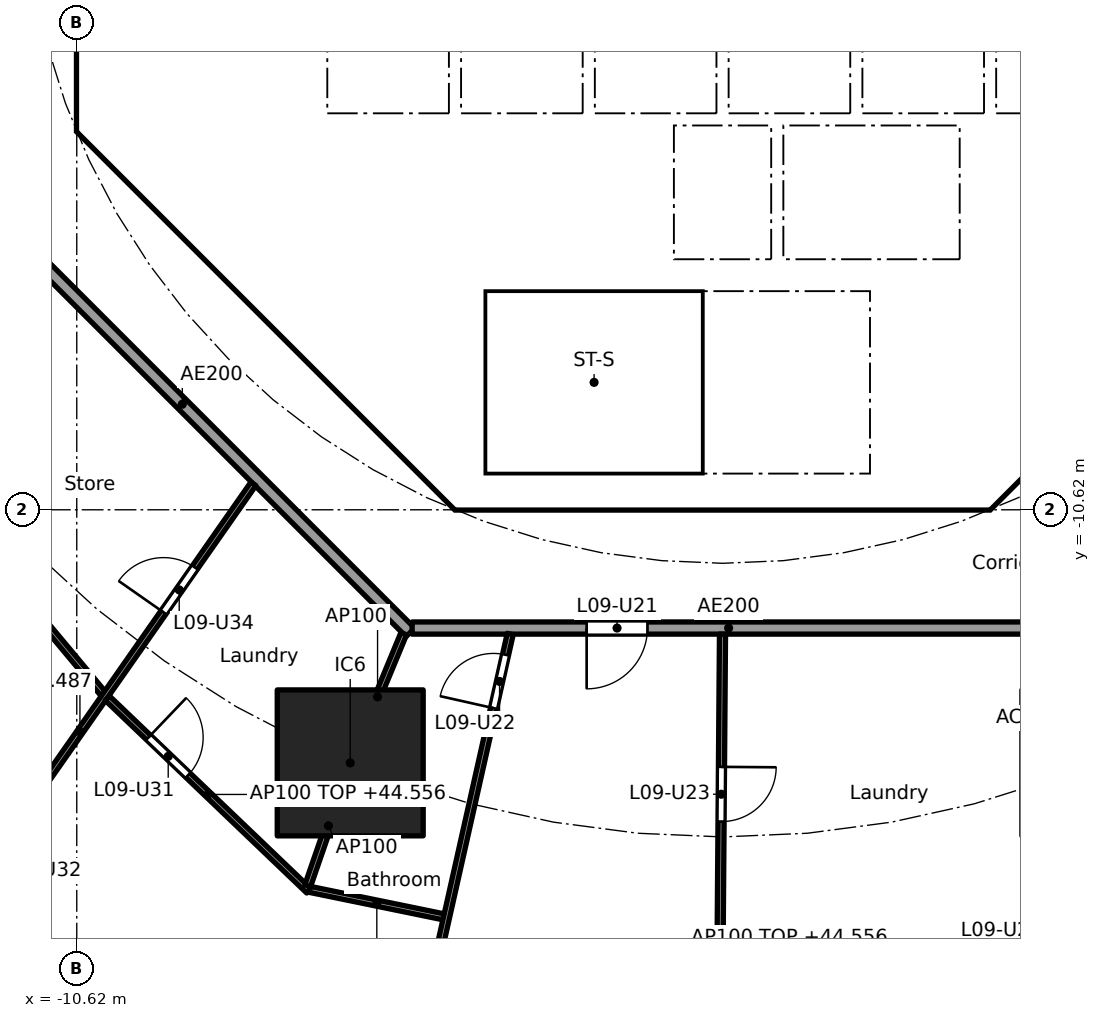
"""IFC4 building model, lengths in metres.
Left out: names, types, materials, properties, quantities, classifications, styles, units other than length and angle.
Written with IfcOpenShell. Run it as: python <this file> out.ifc"""

import sys

from ifc_helpers import new_model, si_unit, direction, frame, frame_2d, origin, origin_2d, place, context, subcontext, project, spatial, polyline, rectangle, outline, extrude, element, fill, save


model = new_model("IFC4")
c1 = context("Model", 3, precision=1e-05, world=origin(), true_north=direction((0.0, 1.0)))
c2 = subcontext(c1, "Body", "Model", "MODEL_VIEW")
j1 = project(units=[si_unit("LENGTHUNIT", "METRE"), si_unit("PLANEANGLEUNIT", "RADIAN")], contexts=[c1])
p1 = place(None, origin())
s1 = spatial("IfcSite", under=j1, at=p1, CompositionType="ELEMENT")
p2 = place(p1, origin())
s2 = spatial("IfcBuilding", under=s1, at=p2, CompositionType="ELEMENT")
p3 = place(p2, frame((0.0, 0.0, 41.8)))
s3 = spatial("IfcBuildingStorey", under=s2, at=p3, CompositionType="ELEMENT", Elevation=41.8)
p4 = place(p3, frame((-6.123, -14.782, 0.0), z_axis=(0.0, 0.0, 1.0), x_axis=(1.0, 0.0, 0.0)))
e1 = element("IfcColumn", 1, at=p4, inside=s3, PredefinedType="COLUMN", context=c2, shape_type="SweptSolid", body=[
    extrude(rectangle(XDim=2.4, YDim=2.4, at=origin_2d()), origin(), (0.0, 0.0, 1.0), 3.7),
])
p5 = place(p3, frame((-10.325, 3.801, 0.0), z_axis=(0.0, 0.0, 1.0), x_axis=(0.0, -1.0, 0.0)))
e2 = element("IfcWall", 2, at=p5, inside=s3, PredefinedType="SHEAR", context=c2, shape_type="SweptSolid", body=[
    extrude(rectangle(XDim=7.602, YDim=0.6, at=frame_2d((3.801, 0.0))), origin(), (0.0, 0.0, 1.0), 3.44),
])
p6 = place(p5, frame((0.651, 0.0, 0.0)))
e3 = element("IfcOpeningElement", 3, at=p6, cuts=e2, PredefinedType="OPENING", context=c2, shape_type="SweptSolid", body=[
    extrude(rectangle(XDim=1.5, YDim=2.1, at=frame_2d((0.75, 1.05))), frame((0.0, 0.31, 0.0), z_axis=(0.0, -1.0, 0.0), x_axis=(1.0, 0.0, 0.0)), (0.0, 0.0, 1.0), 0.62),
])
p7 = place(p5, frame((5.451, 0.0, 0.0)))
e4 = element("IfcOpeningElement", 4, at=p7, cuts=e2, PredefinedType="OPENING", context=c2, shape_type="SweptSolid", body=[
    extrude(rectangle(XDim=1.5, YDim=2.1, at=frame_2d((0.75, 1.05))), frame((0.0, 0.31, 0.0), z_axis=(0.0, -1.0, 0.0), x_axis=(1.0, 0.0, 0.0)), (0.0, 0.0, 1.0), 0.62),
])
p8 = place(p3, frame((-9.988, -4.613, 0.0), z_axis=(0.0, 0.0, 1.0), x_axis=(0.707106781187, -0.707106781187, 0.0)))
e5 = element("IfcWall", 5, at=p8, inside=s3, PredefinedType="SHEAR", context=c2, shape_type="SweptSolid", body=[
    extrude(rectangle(XDim=7.602, YDim=0.6, at=frame_2d((3.801, 0.0))), origin(), (0.0, 0.0, 1.0), 3.44),
])
p9 = place(p8, frame((6.151, 0.0, 0.0)))
e6 = element("IfcOpeningElement", 6, at=p9, cuts=e5, PredefinedType="OPENING", context=c2, shape_type="SweptSolid", body=[
    extrude(rectangle(XDim=1.1, YDim=2.1, at=frame_2d((0.55, 1.05))), frame((0.0, 0.31, 0.0), z_axis=(0.0, -1.0, 0.0), x_axis=(1.0, 0.0, 0.0)), (0.0, 0.0, 1.0), 0.62),
])
p10 = place(p3, frame((4.613, -9.988, 0.0), z_axis=(0.0, 0.0, 1.0), x_axis=(0.707106781187, 0.707106781187, 0.0)))
e7 = element("IfcWall", 7, at=p10, inside=s3, PredefinedType="SHEAR", context=c2, shape_type="SweptSolid", body=[
    extrude(rectangle(XDim=7.602, YDim=0.6, at=frame_2d((3.801, 0.0))), origin(), (0.0, 0.0, 1.0), 3.44),
])
p11 = place(p10, frame((3.201, 0.0, 0.0)))
e8 = element("IfcOpeningElement", 8, at=p11, cuts=e7, PredefinedType="OPENING", context=c2, shape_type="SweptSolid", body=[
    extrude(rectangle(XDim=1.2, YDim=2.1, at=frame_2d((0.6, 1.05))), frame((0.0, 0.31, 0.0), z_axis=(0.0, -1.0, 0.0), x_axis=(1.0, 0.0, 0.0)), (0.0, 0.0, 1.0), 0.62),
])
p12 = place(p3, frame((4.0, -10.025, 0.0), z_axis=(0.0, 0.0, 1.0), x_axis=(0.0, 1.0, 0.0)))
e9 = element("IfcWall", 9, at=p12, inside=s3, PredefinedType="SOLIDWALL", context=c2, shape_type="SweptSolid", body=[
    extrude(rectangle(XDim=3.0, YDim=0.2, at=frame_2d((1.5, 0.0))), origin(), (0.0, 0.0, 1.0), 3.44),
])
p13 = place(p12, frame((0.975, 0.0, 0.0)))
e10 = element("IfcOpeningElement", 10, at=p13, cuts=e9, PredefinedType="OPENING", context=c2, shape_type="SweptSolid", body=[
    extrude(rectangle(XDim=1.1, YDim=2.1, at=frame_2d((0.55, 1.05))), frame((0.0, 0.11, 0.0), z_axis=(0.0, -1.0, 0.0), x_axis=(1.0, 0.0, 0.0)), (0.0, 0.0, 1.0), 0.22),
])
p14 = place(p3, frame((-6.2, -7.827, 0.0), z_axis=(0.0, 0.0, 1.0), x_axis=(0.0, 1.0, 0.0)))
e11 = element("IfcWall", 11, at=p14, inside=s3, PredefinedType="PARTITIONING", context=c2, shape_type="SweptSolid", body=[
    extrude(rectangle(XDim=3.527, YDim=0.15, at=frame_2d((1.763, 0.0))), origin(), (0.0, 0.0, 1.0), 3.44),
])
p15 = place(p14, frame((2.365, 0.0, 0.0)))
e12 = element("IfcOpeningElement", 12, at=p15, cuts=e11, PredefinedType="OPENING", context=c2, shape_type="SweptSolid", body=[
    extrude(rectangle(XDim=0.9, YDim=2.1, at=frame_2d((0.45, 1.05))), frame((0.0, 0.085, 0.0), z_axis=(0.0, -1.0, 0.0), x_axis=(1.0, 0.0, 0.0)), (0.0, 0.0, 1.0), 0.17),
])
p16 = place(p14, frame((0.489, 0.0, 0.0)))
e13 = element("IfcOpeningElement", 13, at=p16, cuts=e11, PredefinedType="OPENING", context=c2, shape_type="SweptSolid", body=[
    extrude(rectangle(XDim=0.9, YDim=2.1, at=frame_2d((0.45, 1.05))), frame((0.0, 0.085, 0.0), z_axis=(0.0, -1.0, 0.0), x_axis=(1.0, 0.0, 0.0)), (0.0, 0.0, 1.0), 0.17),
])
p17 = place(p3, frame((4.0, -6.5, 0.0), z_axis=(0.0, 0.0, 1.0), x_axis=(0.0, 1.0, 0.0)))
e14 = element("IfcWall", 14, at=p17, inside=s3, PredefinedType="SOLIDWALL", context=c2, shape_type="SweptSolid", body=[
    extrude(rectangle(XDim=2.2, YDim=0.2, at=frame_2d((1.1, 0.0))), origin(), (0.0, 0.0, 1.0), 3.44),
])
p18 = place(p17, frame((0.55, 0.0, 0.0)))
e15 = element("IfcOpeningElement", 15, at=p18, cuts=e14, PredefinedType="OPENING", context=c2, shape_type="SweptSolid", body=[
    extrude(rectangle(XDim=1.1, YDim=2.1, at=frame_2d((0.55, 1.05))), frame((0.0, 0.11, 0.0), z_axis=(0.0, -1.0, 0.0), x_axis=(1.0, 0.0, 0.0)), (0.0, 0.0, 1.0), 0.22),
])
p19 = place(p3, frame((-4.0, -6.5, 0.0), z_axis=(0.0, 0.0, 1.0), x_axis=(0.0, 1.0, 0.0)))
e16 = element("IfcWall", 16, at=p19, inside=s3, PredefinedType="SOLIDWALL", context=c2, shape_type="SweptSolid", body=[
    extrude(rectangle(XDim=2.2, YDim=0.2, at=frame_2d((1.1, 0.0))), origin(), (0.0, 0.0, 1.0), 3.44),
])
p20 = place(p19, frame((0.65, 0.0, 0.0)))
e17 = element("IfcOpeningElement", 17, at=p20, cuts=e16, PredefinedType="OPENING", context=c2, shape_type="SweptSolid", body=[
    extrude(rectangle(XDim=0.9, YDim=2.1, at=frame_2d((0.45, 1.05))), frame((0.0, 0.11, 0.0), z_axis=(0.0, -1.0, 0.0), x_axis=(1.0, 0.0, 0.0)), (0.0, 0.0, 1.0), 0.22),
])
p21 = place(p3, origin())
e18 = element("IfcWall", 18, at=p21, inside=s3, PredefinedType="SHEAR", context=c2, shape_type="SweptSolid", body=[
    extrude(outline(polyline([(-10.625, -3.801), (-10.025, -3.801), (-10.025, -4.152), (-9.776, -4.401), (-10.2, -4.825), (-10.625, -4.401), (-10.625, -3.801)])), origin(), (0.0, 0.0, 1.0), 3.44),
])
p22 = place(p3, origin())
e19 = element("IfcWall", 19, at=p22, inside=s3, PredefinedType="SHEAR", context=c2, shape_type="SweptSolid", body=[
    extrude(outline(polyline([(-4.152, -10.025), (4.152, -10.025), (4.401, -9.776), (4.825, -10.2), (4.401, -10.625), (-4.401, -10.625), (-4.825, -10.2), (-4.401, -9.776), (-4.152, -10.025)])), origin(), (0.0, 0.0, 1.0), 3.44),
])
p23 = place(p3, frame((-10.025, -4.0, 0.0), z_axis=(0.0, 0.0, 1.0), x_axis=(1.0, 0.0, 0.0)))
e20 = element("IfcWall", 20, at=p23, inside=s3, PredefinedType="PARTITIONING", context=c2, shape_type="SweptSolid", body=[
    extrude(rectangle(XDim=3.325, YDim=0.2, at=frame_2d((1.662, 0.0))), origin(), (0.0, 0.0, 1.0), 3.44),
])
p24 = place(p3, frame((-8.301, -5.8, 0.0), z_axis=(0.0, 0.0, 1.0), x_axis=(1.0, 0.0, 0.0)))
e21 = element("IfcWall", 21, at=p24, inside=s3, PredefinedType="PARTITIONING", context=c2, shape_type="SweptSolid", body=[
    extrude(rectangle(XDim=2.026, YDim=0.15, at=frame_2d((1.013, 0.0))), origin(), (0.0, 0.0, 1.0), 3.44),
])
for number, where, z_axis, x_axis in (
    (22, (-0.9, -6.5, 0.0), (0.0, 0.0, 1.0), (0.0, 1.0, 0.0)),
    (23, (0.9, -6.5, 0.0), (0.0, 0.0, 1.0), (0.0, 1.0, 0.0)),
):
    element("IfcWall", number, at=place(p3, frame(where, z_axis=z_axis, x_axis=x_axis)), inside=s3, PredefinedType="SOLIDWALL", context=c2, shape_type="SweptSolid", body=[
        extrude(rectangle(XDim=2.2, YDim=0.2, at=frame_2d((1.1, 0.0))), origin(), (0.0, 0.0, 1.0), 3.44),
    ])
p25 = place(p3, origin())
e24 = element("IfcWall", 24, at=p25, inside=s3, PredefinedType="SOLIDWALL", context=c2, shape_type="SweptSolid", body=[
    extrude(outline(polyline([(-6.7, -2.1), (-6.5, -2.1), (-6.5, -4.1), (-4.5, -4.1), (-4.5, -2.1), (-4.3, -2.1), (-4.3, -4.1), (-2.3, -4.1), (-2.3, -2.1), (-2.1, -2.1), (-2.1, -4.1), (-0.1, -4.1), (-0.1, -2.1), (0.1, -2.1), (0.1, -4.1), (2.1, -4.1), (2.1, -2.1), (2.3, -2.1), (2.3, -4.1), (4.3, -4.1), (4.3, -2.1), (4.5, -2.1), (4.5, -4.1), (6.5, -4.1), (6.5, -2.1), (6.7, -2.1), (6.7, -4.3), (-6.7, -4.3), (-6.7, -2.1)])), origin(), (0.0, 0.0, 1.0), 3.44),
])
p26 = place(p3, origin())
e25 = element("IfcWall", 25, at=p26, inside=s3, PredefinedType="SOLIDWALL", context=c2, shape_type="SweptSolid", body=[
    extrude(outline(polyline([(-3.9, -10.025), (-4.1, -10.025), (-4.1, -7.025), (-3.9, -7.025), (-3.9, -10.025)])), origin(), (0.0, 0.0, 1.0), 3.44),
])
p27 = place(p3, origin())
e26 = element("IfcWall", 26, at=p27, inside=s3, PredefinedType="SOLIDWALL", context=c2, shape_type="SweptSolid", body=[
    extrude(outline(polyline([(4.1, -7.025), (-4.1, -7.025), (-4.1, -6.5), (4.1, -6.5), (4.1, -7.025)])), origin(), (0.0, 0.0, 1.0), 3.44),
])
p28 = place(p3, frame((-12.635, -5.134, 0.0), z_axis=(0.0, 0.0, 1.0), x_axis=(0.707106781187, -0.707106781187, 0.0)))
e27 = element("IfcWall", 27, at=p28, inside=s3, PredefinedType="PARTITIONING", context=c2, shape_type="SweptSolid", body=[
    extrude(rectangle(XDim=10.609, YDim=0.2, at=frame_2d((5.305, 0.0))), origin(), (0.0, 0.0, 1.0), 3.44),
])
p29 = place(p3, frame((-5.104, -12.565, 0.0), z_axis=(0.0, 0.0, 1.0), x_axis=(1.0, 0.0, 0.0)))
e28 = element("IfcWall", 28, at=p29, inside=s3, PredefinedType="PARTITIONING", context=c2, shape_type="SweptSolid", body=[
    extrude(rectangle(XDim=10.409, YDim=0.2, at=frame_2d((5.205, 0.0))), origin(), (0.0, 0.0, 1.0), 3.44),
])
p30 = place(p29, frame((2.87, 0.0, 0.0)))
e29 = element("IfcOpeningElement", 29, at=p30, cuts=e28, PredefinedType="OPENING", context=c2, shape_type="SweptSolid", body=[
    extrude(rectangle(XDim=1.0, YDim=2.1, at=frame_2d((0.5, 1.05))), frame((0.0, 0.11, 0.0), z_axis=(0.0, -1.0, 0.0), x_axis=(1.0, 0.0, 0.0)), (0.0, 0.0, 1.0), 0.22),
])
p31 = place(p3, frame((-13.222, -10.007, 0.0), z_axis=(0.0, 0.0, 1.0), x_axis=(0.640807748916, -0.767701393075, 0.0)))
e30 = element("IfcWall", 30, at=p31, inside=s3, PredefinedType="PARTITIONING", context=c2, shape_type="SweptSolid", body=[
    extrude(rectangle(XDim=4.737, YDim=0.1, at=frame_2d((2.368, 0.0))), origin(), (0.0, 0.0, 1.0), 2.756),
])
p32 = place(p3, frame((-7.715, -10.193, 0.0), z_axis=(0.0, 0.0, 1.0), x_axis=(-0.573126502256, -0.819466907454, 0.0)))
e31 = element("IfcWall", 31, at=p32, inside=s3, PredefinedType="PARTITIONING", context=c2, shape_type="SweptSolid", body=[
    extrude(rectangle(XDim=9.954, YDim=0.1, at=frame_2d((4.977, 0.0))), origin(), (0.0, 0.0, 1.0), 2.687),
])
p33 = place(p32, frame((6.631, 0.0, 0.0)))
e32 = element("IfcOpeningElement", 32, at=p33, cuts=e31, PredefinedType="OPENING", context=c2, shape_type="SweptSolid", body=[
    extrude(rectangle(XDim=0.9, YDim=2.1, at=frame_2d((0.45, 1.05))), frame((0.0, 0.06, 0.0), z_axis=(0.0, -1.0, 0.0), x_axis=(1.0, 0.0, 0.0)), (0.0, 0.0, 1.0), 0.12),
])
p34 = place(p32, frame((1.678, 0.0, 0.0)))
e33 = element("IfcOpeningElement", 33, at=p34, cuts=e31, PredefinedType="OPENING", context=c2, shape_type="SweptSolid", body=[
    extrude(rectangle(XDim=0.9, YDim=2.1, at=frame_2d((0.45, 1.05))), frame((0.0, 0.06, 0.0), z_axis=(0.0, -1.0, 0.0), x_axis=(1.0, 0.0, 0.0)), (0.0, 0.0, 1.0), 0.12),
])
p35 = place(p3, frame((-10.119, -13.716, 0.0), z_axis=(0.0, 0.0, 1.0), x_axis=(0.722763212502, -0.69109575216, 0.0)))
e34 = element("IfcWall", 34, at=p35, inside=s3, PredefinedType="PARTITIONING", context=c2, shape_type="SweptSolid", body=[
    extrude(rectangle(XDim=4.587, YDim=0.1, at=frame_2d((2.293, 0.0))), origin(), (0.0, 0.0, 1.0), 2.756),
])
p36 = place(p35, frame((0.938, 0.0, 0.0)))
e35 = element("IfcOpeningElement", 35, at=p36, cuts=e34, PredefinedType="OPENING", context=c2, shape_type="SweptSolid", body=[
    extrude(rectangle(XDim=0.9, YDim=2.1, at=frame_2d((0.45, 1.05))), frame((0.0, 0.06, 0.0), z_axis=(0.0, -1.0, 0.0), x_axis=(1.0, 0.0, 0.0)), (0.0, 0.0, 1.0), 0.12),
])
p37 = place(p3, frame((-5.243, -12.657, 0.0), z_axis=(0.0, 0.0, 1.0), x_axis=(-0.382719158442, -0.923864733477, 0.0)))
e36 = element("IfcWall", 36, at=p37, inside=s3, PredefinedType="PARTITIONING", context=c2, shape_type="SweptSolid", body=[
    extrude(rectangle(XDim=2.25, YDim=0.1, at=frame_2d((1.125, 0.0))), origin(), (0.0, 0.0, 1.0), 3.44),
])
p38 = place(p3, frame((-6.139, -14.83, 0.0), z_axis=(0.0, 0.0, 1.0), x_axis=(-0.327246993321, -0.944938836837, 0.0)))
e37 = element("IfcWall", 37, at=p38, inside=s3, PredefinedType="PARTITIONING", context=c2, shape_type="SweptSolid", body=[
    extrude(rectangle(XDim=2.09, YDim=0.1, at=frame_2d((1.045, 0.0))), origin(), (0.0, 0.0, 1.0), 3.44),
])
p39 = place(p3, frame((-6.791, -16.862, 0.0), z_axis=(0.0, 0.0, 1.0), x_axis=(0.979581941859, -0.201045316246, 0.0)))
e38 = element("IfcWall", 38, at=p39, inside=s3, PredefinedType="PARTITIONING", context=c2, shape_type="SweptSolid", body=[
    extrude(rectangle(XDim=2.256, YDim=0.1, at=frame_2d((1.128, 0.0))), origin(), (0.0, 0.0, 1.0), 2.756),
])
p40 = place(p3, frame((-3.492, -12.662, 0.0), z_axis=(0.0, 0.0, 1.0), x_axis=(-0.219268088006, -0.975664648115, 0.0)))
e39 = element("IfcWall", 39, at=p40, inside=s3, PredefinedType="PARTITIONING", context=c2, shape_type="SweptSolid", body=[
    extrude(rectangle(XDim=18.23, YDim=0.1, at=frame_2d((9.115, 0.0))), origin(), (0.0, 0.0, 1.0), 2.687),
])
p41 = place(p40, frame((0.35, 0.0, 0.0)))
e40 = element("IfcOpeningElement", 40, at=p41, cuts=e39, PredefinedType="OPENING", context=c2, shape_type="SweptSolid", body=[
    extrude(rectangle(XDim=0.9, YDim=2.1, at=frame_2d((0.45, 1.05))), frame((0.0, 0.06, 0.0), z_axis=(0.0, -1.0, 0.0), x_axis=(1.0, 0.0, 0.0)), (0.0, 0.0, 1.0), 0.12),
])
p42 = place(p40, frame((7.497, 0.0, 0.0)))
e41 = element("IfcOpeningElement", 41, at=p42, cuts=e39, PredefinedType="OPENING", context=c2, shape_type="SweptSolid", body=[
    extrude(rectangle(XDim=0.9, YDim=2.1, at=frame_2d((0.45, 1.05))), frame((0.0, 0.06, 0.0), z_axis=(0.0, -1.0, 0.0), x_axis=(1.0, 0.0, 0.0)), (0.0, 0.0, 1.0), 0.12),
])
p43 = place(p3, frame((-0.001, -12.665, 0.0), z_axis=(0.0, 0.0, 1.0), x_axis=(-0.007702417287, -0.999970335944, 0.0)))
e42 = element("IfcWall", 42, at=p43, inside=s3, PredefinedType="PARTITIONING", context=c2, shape_type="SweptSolid", body=[
    extrude(rectangle(XDim=12.171, YDim=0.1, at=frame_2d((6.086, 0.0))), origin(), (0.0, 0.0, 1.0), 2.687),
])
p44 = place(p43, frame((2.183, 0.0, 0.0)))
e43 = element("IfcOpeningElement", 43, at=p44, cuts=e42, PredefinedType="OPENING", context=c2, shape_type="SweptSolid", body=[
    extrude(rectangle(XDim=0.9, YDim=2.1, at=frame_2d((0.45, 1.05))), frame((0.0, 0.06, 0.0), z_axis=(0.0, -1.0, 0.0), x_axis=(1.0, 0.0, 0.0)), (0.0, 0.0, 1.0), 0.12),
])
p45 = place(p43, frame((8.269, 0.0, 0.0)))
e44 = element("IfcOpeningElement", 44, at=p45, cuts=e42, PredefinedType="OPENING", context=c2, shape_type="SweptSolid", body=[
    extrude(rectangle(XDim=0.9, YDim=2.1, at=frame_2d((0.45, 1.05))), frame((0.0, 0.06, 0.0), z_axis=(0.0, -1.0, 0.0), x_axis=(1.0, 0.0, 0.0)), (0.0, 0.0, 1.0), 0.12),
])
p46 = place(p18, origin())
e45 = element("IfcDoor", 45, at=p46, inside=s3, OperationType="DOUBLE_DOOR_SLIDING", PredefinedType="DOOR", context=c2, shape_type="SweptSolid", body=[
    extrude(rectangle(XDim=1.1, YDim=2.1, at=frame_2d((0.55, 1.05))), frame((0.0, 0.025, 0.0), z_axis=(0.0, -1.0, 0.0), x_axis=(1.0, 0.0, 0.0)), (0.0, 0.0, 1.0), 0.05),
])
fill(e15, e45)
p47 = place(p13, origin())
e46 = element("IfcDoor", 46, at=p47, inside=s3, OperationType="SINGLE_SWING_RIGHT", PredefinedType="DOOR", context=c2, shape_type="SweptSolid", body=[
    extrude(rectangle(XDim=1.1, YDim=2.1, at=frame_2d((0.55, 1.05))), frame((0.0, 0.025, 0.0), z_axis=(0.0, -1.0, 0.0), x_axis=(1.0, 0.0, 0.0)), (0.0, 0.0, 1.0), 0.05),
])
fill(e10, e46)
p48 = place(p15, origin())
e47 = element("IfcDoor", 47, at=p48, inside=s3, OperationType="SINGLE_SWING_RIGHT", PredefinedType="DOOR", context=c2, shape_type="SweptSolid", body=[
    extrude(rectangle(XDim=0.9, YDim=2.1, at=frame_2d((0.45, 1.05))), frame((0.0, 0.025, 0.0), z_axis=(0.0, -1.0, 0.0), x_axis=(1.0, 0.0, 0.0)), (0.0, 0.0, 1.0), 0.05),
])
fill(e12, e47)
p49 = place(p16, origin())
e48 = element("IfcDoor", 48, at=p49, inside=s3, OperationType="SINGLE_SWING_RIGHT", PredefinedType="DOOR", context=c2, shape_type="SweptSolid", body=[
    extrude(rectangle(XDim=0.9, YDim=2.1, at=frame_2d((0.45, 1.05))), frame((0.0, 0.025, 0.0), z_axis=(0.0, -1.0, 0.0), x_axis=(1.0, 0.0, 0.0)), (0.0, 0.0, 1.0), 0.05),
])
fill(e13, e48)
p50 = place(p20, frame((0.9, 0.0, 0.0), x_axis=(-1.0, 0.0, 0.0)))
e49 = element("IfcDoor", 49, at=p50, inside=s3, OperationType="SINGLE_SWING_RIGHT", PredefinedType="DOOR", context=c2, shape_type="SweptSolid", body=[
    extrude(rectangle(XDim=0.9, YDim=2.1, at=frame_2d((0.45, 1.05))), frame((0.0, 0.025, 0.0), z_axis=(0.0, -1.0, 0.0), x_axis=(1.0, 0.0, 0.0)), (0.0, 0.0, 1.0), 0.05),
])
fill(e17, e49)
p51 = place(p7, origin())
e50 = element("IfcDoor", 50, at=p51, inside=s3, OperationType="DOUBLE_DOOR_SINGLE_SWING", PredefinedType="DOOR", context=c2, shape_type="SweptSolid", body=[
    extrude(rectangle(XDim=1.5, YDim=2.1, at=frame_2d((0.75, 1.05))), frame((0.0, 0.025, 0.0), z_axis=(0.0, -1.0, 0.0), x_axis=(1.0, 0.0, 0.0)), (0.0, 0.0, 1.0), 0.05),
])
fill(e4, e50)
p52 = place(p9, origin())
e51 = element("IfcDoor", 51, at=p52, inside=s3, OperationType="SINGLE_SWING_RIGHT", PredefinedType="DOOR", context=c2, shape_type="SweptSolid", body=[
    extrude(rectangle(XDim=1.1, YDim=2.1, at=frame_2d((0.55, 1.05))), frame((0.0, 0.025, 0.0), z_axis=(0.0, -1.0, 0.0), x_axis=(1.0, 0.0, 0.0)), (0.0, 0.0, 1.0), 0.05),
])
fill(e6, e51)
p53 = place(p30, frame((1.0, 0.0, 0.0), x_axis=(-1.0, 0.0, 0.0)))
e52 = element("IfcDoor", 52, at=p53, inside=s3, OperationType="SINGLE_SWING_RIGHT", PredefinedType="DOOR", context=c2, shape_type="SweptSolid", body=[
    extrude(rectangle(XDim=1.0, YDim=2.1, at=frame_2d((0.5, 1.05))), frame((0.0, 0.025, 0.0), z_axis=(0.0, -1.0, 0.0), x_axis=(1.0, 0.0, 0.0)), (0.0, 0.0, 1.0), 0.05),
])
fill(e29, e52)
p54 = place(p41, frame((0.9, 0.0, 0.0), x_axis=(-1.0, 0.0, 0.0)))
e53 = element("IfcDoor", 53, at=p54, inside=s3, OperationType="SINGLE_SWING_LEFT", PredefinedType="DOOR", context=c2, shape_type="SweptSolid", body=[
    extrude(rectangle(XDim=0.9, YDim=2.1, at=frame_2d((0.45, 1.05))), frame((0.0, 0.025, 0.0), z_axis=(0.0, -1.0, 0.0), x_axis=(1.0, 0.0, 0.0)), (0.0, 0.0, 1.0), 0.05),
])
fill(e40, e53)
p55 = place(p44, origin())
e54 = element("IfcDoor", 54, at=p55, inside=s3, OperationType="SINGLE_SWING_LEFT", PredefinedType="DOOR", context=c2, shape_type="SweptSolid", body=[
    extrude(rectangle(XDim=0.9, YDim=2.1, at=frame_2d((0.45, 1.05))), frame((0.0, 0.025, 0.0), z_axis=(0.0, -1.0, 0.0), x_axis=(1.0, 0.0, 0.0)), (0.0, 0.0, 1.0), 0.05),
])
fill(e43, e54)
p56 = place(p36, origin())
e55 = element("IfcDoor", 55, at=p56, inside=s3, OperationType="SINGLE_SWING_LEFT", PredefinedType="DOOR", context=c2, shape_type="SweptSolid", body=[
    extrude(rectangle(XDim=0.9, YDim=2.1, at=frame_2d((0.45, 1.05))), frame((0.0, 0.025, 0.0), z_axis=(0.0, -1.0, 0.0), x_axis=(1.0, 0.0, 0.0)), (0.0, 0.0, 1.0), 0.05),
])
fill(e35, e55)
p57 = place(p34, frame((0.9, 0.0, 0.0), x_axis=(-1.0, 0.0, 0.0)))
e56 = element("IfcDoor", 56, at=p57, inside=s3, OperationType="SINGLE_SWING_LEFT", PredefinedType="DOOR", context=c2, shape_type="SweptSolid", body=[
    extrude(rectangle(XDim=0.9, YDim=2.1, at=frame_2d((0.45, 1.05))), frame((0.0, 0.025, 0.0), z_axis=(0.0, -1.0, 0.0), x_axis=(1.0, 0.0, 0.0)), (0.0, 0.0, 1.0), 0.05),
])
fill(e33, e56)
save(model, sys.argv[1])
